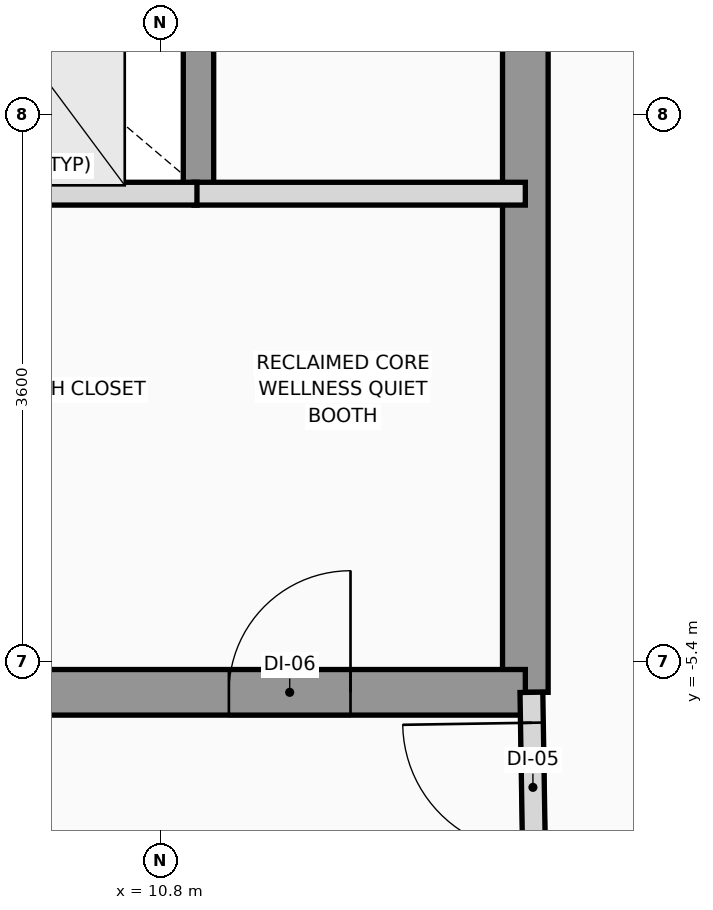
"""IFC4 building model, lengths in metres.
Left out: names, types, materials, properties, quantities, classifications, styles, units other than length and angle.
Written with IfcOpenShell. Run it as: python <this file> out.ifc"""

import sys

from ifc_helpers import new_model, si_unit, direction, frame, frame_2d, origin, place, context, subcontext, project, spatial, rectangle, extrude, source, transform, mapped, element, fill, save


model = new_model("IFC4")
c1 = context("Model", 3, precision=1e-05, world=origin(), true_north=direction((0.0, 1.0)))
c2 = subcontext(c1, "Body", "Model", "MODEL_VIEW")
j1 = project(units=[si_unit("LENGTHUNIT", "METRE"), si_unit("PLANEANGLEUNIT", "RADIAN")], contexts=[c1])
p1 = place(None, origin())
s1 = spatial("IfcSite", under=j1, at=p1, CompositionType="ELEMENT")
p2 = place(p1, origin())
s2 = spatial("IfcBuilding", under=s1, at=p2, CompositionType="ELEMENT")
p3 = place(p2, frame((0.0, 0.0, 223.6)))
s3 = spatial("IfcBuildingStorey", under=s2, at=p3, CompositionType="ELEMENT", Elevation=223.6)
p4 = place(p3, frame((13.2, -5.6, 0.0), z_axis=(0.0, 0.0, 1.0), x_axis=(0.0, 1.0, 0.0)))
e1 = element("IfcWall", 1, at=p4, inside=s3, PredefinedType="SHEAR", context=c2, shape_type="SweptSolid", body=[
    extrude(rectangle(XDim=11.2, YDim=0.3, at=frame_2d((5.6, 0.0))), origin(), (0.0, 0.0, 1.0), 3.01),
])
p5 = place(p3, frame((5.4, -5.6, 0.0), z_axis=(0.0, 0.0, 1.0), x_axis=(1.0, 0.0, 0.0)))
e2 = element("IfcWall", 2, at=p5, inside=s3, PredefinedType="SHEAR", context=c2, shape_type="SweptSolid", body=[
    extrude(rectangle(XDim=7.8, YDim=0.3, at=frame_2d((3.9, 0.0))), origin(), (0.0, 0.0, 1.0), 3.01),
])
p6 = place(p5, frame((5.85, 0.0, 0.0)))
e3 = element("IfcOpeningElement", 3, at=p6, cuts=e2, PredefinedType="OPENING", context=c2, shape_type="SweptSolid", body=[
    extrude(rectangle(XDim=0.8, YDim=2.1, at=frame_2d((0.4, 1.05))), frame((0.0, 0.16, 0.0), z_axis=(0.0, -1.0, 0.0), x_axis=(1.0, 0.0, 0.0)), (0.0, 0.0, 1.0), 0.32),
])
p7 = place(p5, frame((1.2, 0.0, 0.0)))
e4 = element("IfcOpeningElement", 4, at=p7, cuts=e2, PredefinedType="OPENING", context=c2, shape_type="SweptSolid", body=[
    extrude(rectangle(XDim=0.85, YDim=2.1, at=frame_2d((0.425, 1.05))), frame((0.0, 0.16, 0.0), z_axis=(0.0, -1.0, 0.0), x_axis=(1.0, 0.0, 0.0)), (0.0, 0.0, 1.0), 0.32),
])
p8 = place(p5, frame((3.4, 0.0, 0.0)))
e5 = element("IfcOpeningElement", 5, at=p8, cuts=e2, PredefinedType="OPENING", context=c2, shape_type="SweptSolid", body=[
    extrude(rectangle(XDim=0.85, YDim=2.1, at=frame_2d((0.425, 1.05))), frame((0.0, 0.16, 0.0), z_axis=(0.0, -1.0, 0.0), x_axis=(1.0, 0.0, 0.0)), (0.0, 0.0, 1.0), 0.32),
])
p9 = place(p3, frame((11.05, -2.28, 0.0), z_axis=(0.0, 0.0, 1.0), x_axis=(0.0, 1.0, 0.0)))
e6 = element("IfcWall", 6, at=p9, inside=s3, PredefinedType="SOLIDWALL", context=c2, shape_type="SweptSolid", body=[
    extrude(rectangle(XDim=2.18, YDim=0.2, at=frame_2d((1.09, 0.0))), origin(), (0.0, 0.0, 1.0), 3.01),
])
p10 = place(p3, frame((11.02, -2.32, 0.0), z_axis=(0.0, 0.0, 1.0), x_axis=(1.0, 0.0, 0.0)))
e7 = element("IfcWall", 7, at=p10, inside=s3, PredefinedType="PARTITIONING", context=c2, shape_type="SweptSolid", body=[
    extrude(rectangle(XDim=2.18, YDim=0.15, at=frame_2d((1.09, 0.0))), origin(), (0.0, 0.0, 1.0), 3.01),
])
p11 = place(p3, frame((8.48, -2.32, 0.0), z_axis=(0.0, 0.0, 1.0), x_axis=(1.0, 0.0, 0.0)))
e8 = element("IfcWall", 8, at=p11, inside=s3, PredefinedType="PARTITIONING", context=c2, shape_type="SweptSolid", body=[
    extrude(rectangle(XDim=2.56, YDim=0.15, at=frame_2d((1.28, 0.0))), origin(), (0.0, 0.0, 1.0), 3.01),
])
p12 = place(p3, frame((13.26, -6.85, 0.0), z_axis=(0.0, 0.0, 1.0), x_axis=(-0.016013571389, 0.999871774545, 0.0)))
e9 = element("IfcWall", 9, at=p12, inside=s3, PredefinedType="PARTITIONING", context=c2, shape_type="SweptSolid", body=[
    extrude(rectangle(XDim=1.25, YDim=0.15, at=frame_2d((0.625, 0.0))), origin(), (0.0, 0.0, 1.0), 3.01),
])
p13 = place(p12, frame((0.2, 0.0, 0.0)))
e10 = element("IfcOpeningElement", 10, at=p13, cuts=e9, PredefinedType="OPENING", context=c2, shape_type="SweptSolid", body=[
    extrude(rectangle(XDim=0.85, YDim=2.1, at=frame_2d((0.425, 1.05))), frame((0.0, 0.085, 0.0), z_axis=(0.0, -1.0, 0.0), x_axis=(1.0, 0.0, 0.0)), (0.0, 0.0, 1.0), 0.17),
])
m1 = source(origin(), c2, "Body", "SweptSolid", [
    extrude(rectangle(XDim=0.8, YDim=2.1, at=frame_2d((0.4, 1.05))), frame((0.0, 0.025, 0.0), z_axis=(0.0, -1.0, 0.0), x_axis=(1.0, 0.0, 0.0)), (0.0, 0.0, 1.0), 0.05),
])
p14 = place(p6, origin())
e11 = element("IfcDoor", 11, at=p14, inside=s3, OperationType="SINGLE_SWING_RIGHT", PredefinedType="DOOR", context=c2, shape_type="MappedRepresentation", body=[
    mapped(m1, transform((0.0, 0.0, 0.0), x_axis=(1.0, 0.0, 0.0), y_axis=(0.0, 1.0, 0.0), z_axis=(0.0, 0.0, 1.0), scale=1.0)),
])
fill(e3, e11)
m2 = source(origin(), c2, "Body", "SweptSolid", [
    extrude(rectangle(XDim=0.85, YDim=2.1, at=frame_2d((0.425, 1.05))), frame((0.0, 0.025, 0.0), z_axis=(0.0, -1.0, 0.0), x_axis=(1.0, 0.0, 0.0)), (0.0, 0.0, 1.0), 0.05),
])
p15 = place(p13, origin())
e12 = element("IfcDoor", 12, at=p15, inside=s3, OperationType="SINGLE_SWING_RIGHT", PredefinedType="DOOR", context=c2, shape_type="MappedRepresentation", body=[
    mapped(m2, transform((0.0, 0.0, 0.0), x_axis=(1.0, 0.0, 0.0), y_axis=(0.0, 1.0, 0.0), z_axis=(0.0, 0.0, 1.0), scale=1.0)),
])
fill(e10, e12)
save(model, sys.argv[1])
